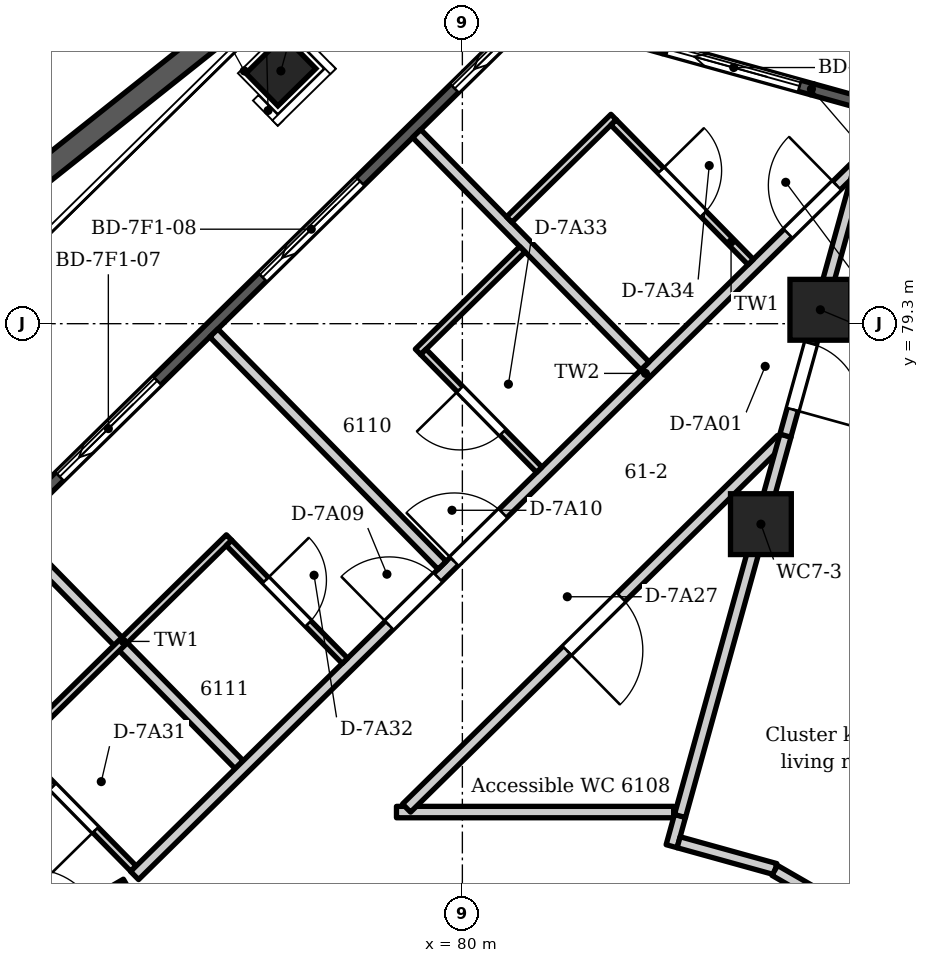
"""IFC4 building model, lengths in metres.
Left out: names, types, materials, properties, quantities, classifications, styles, units other than length and angle.
Written with IfcOpenShell. Run it as: python <this file> out.ifc"""

import sys

from ifc_helpers import new_model, si_unit, direction, frame, frame_2d, origin, origin_2d, place, context, subcontext, project, spatial, polyline, rectangle, circle, outline, extrude, element, fill, save


model = new_model("IFC4")
c1 = context("Model", 3, precision=1e-05, world=origin(), true_north=direction((0.0, 1.0)))
c2 = subcontext(c1, "Body", "Model", "MODEL_VIEW")
j1 = project(units=[si_unit("LENGTHUNIT", "METRE"), si_unit("PLANEANGLEUNIT", "RADIAN")], contexts=[c1])
p1 = place(None, origin())
s1 = spatial("IfcSite", under=j1, at=p1, CompositionType="ELEMENT")
p2 = place(p1, origin())
s2 = spatial("IfcBuilding", under=s1, at=p2, CompositionType="ELEMENT")
p3 = place(p2, frame((0.0, 0.0, 234.9)))
s3 = spatial("IfcBuildingStorey", under=s2, at=p3, CompositionType="ELEMENT", Elevation=234.9)
p4 = place(p3, frame((77.613, 82.625, -0.35), z_axis=(0.0, 0.0, 1.0), x_axis=(0.713250449154, 0.7009092643, 0.0)))
e1 = element("IfcColumn", 1, at=p4, inside=s3, PredefinedType="COLUMN", context=c2, shape_type="SweptSolid", body=[
    extrude(rectangle(XDim=0.7, YDim=0.6, at=origin_2d()), origin(), (0.0, 0.0, 1.0), 3.95),
])
for number, where, z_axis, x_axis in (
    (2, (83.928, 76.663, -0.35), (0.0, 0.0, 1.0), (1.0, 0.0, 0.0)),
    (3, (84.71, 79.483, -0.35), (0.0, 0.0, 1.0), (1.0, 0.0, 0.0)),
):
    element("IfcColumn", number, at=place(p3, frame(where, z_axis=z_axis, x_axis=x_axis)), inside=s3, PredefinedType="COLUMN", context=c2, shape_type="SweptSolid", body=[
        extrude(circle(Radius=0.4, at=origin_2d()), origin(), (0.0, 0.0, 1.0), 3.95),
    ])
p5 = place(p3, frame((57.99, 60.867, 0.0), z_axis=(0.0, 0.0, 1.0), x_axis=(0.713254682671, 0.700904956216, 0.0)))
e4 = element("IfcWall", 4, at=p5, inside=s3, PredefinedType="SOLIDWALL", context=c2, shape_type="SweptSolid", body=[
    extrude(outline(polyline([(0.149, 0.075), (0.149, -0.075), (33.537, -0.075), (33.537, 0.075), (0.149, 0.075)])), origin(), (0.0, 0.0, 1.0), 3.3),
])
p6 = place(p5, frame((1.171, 0.0, 0.0)))
e5 = element("IfcOpeningElement", 5, at=p6, cuts=e4, PredefinedType="OPENING", context=c2, shape_type="SweptSolid", body=[
    extrude(rectangle(XDim=1.8, YDim=2.6, at=frame_2d((0.9, 1.3))), frame((0.0, 0.085, 0.0), z_axis=(0.0, -1.0, 0.0), x_axis=(1.0, 0.0, 0.0)), (0.0, 0.0, 1.0), 0.17),
])
p7 = place(p5, frame((4.714, 0.0, 0.0)))
e6 = element("IfcOpeningElement", 6, at=p7, cuts=e4, PredefinedType="OPENING", context=c2, shape_type="SweptSolid", body=[
    extrude(rectangle(XDim=1.8, YDim=2.6, at=frame_2d((0.9, 1.3))), frame((0.0, 0.085, 0.0), z_axis=(0.0, -1.0, 0.0), x_axis=(1.0, 0.0, 0.0)), (0.0, 0.0, 1.0), 0.17),
])
p8 = place(p5, frame((8.457, 0.0, 0.0)))
e7 = element("IfcOpeningElement", 7, at=p8, cuts=e4, PredefinedType="OPENING", context=c2, shape_type="SweptSolid", body=[
    extrude(rectangle(XDim=1.8, YDim=2.6, at=frame_2d((0.9, 1.3))), frame((0.0, 0.085, 0.0), z_axis=(0.0, -1.0, 0.0), x_axis=(1.0, 0.0, 0.0)), (0.0, 0.0, 1.0), 0.17),
])
p9 = place(p5, frame((12.2, 0.0, 0.0)))
e8 = element("IfcOpeningElement", 8, at=p9, cuts=e4, PredefinedType="OPENING", context=c2, shape_type="SweptSolid", body=[
    extrude(rectangle(XDim=1.8, YDim=2.6, at=frame_2d((0.9, 1.3))), frame((0.0, 0.085, 0.0), z_axis=(0.0, -1.0, 0.0), x_axis=(1.0, 0.0, 0.0)), (0.0, 0.0, 1.0), 0.17),
])
p10 = place(p5, frame((15.943, 0.0, 0.0)))
e9 = element("IfcOpeningElement", 9, at=p10, cuts=e4, PredefinedType="OPENING", context=c2, shape_type="SweptSolid", body=[
    extrude(rectangle(XDim=1.8, YDim=2.6, at=frame_2d((0.9, 1.3))), frame((0.0, 0.085, 0.0), z_axis=(0.0, -1.0, 0.0), x_axis=(1.0, 0.0, 0.0)), (0.0, 0.0, 1.0), 0.17),
])
p11 = place(p5, frame((19.686, 0.0, 0.0)))
e10 = element("IfcOpeningElement", 10, at=p11, cuts=e4, PredefinedType="OPENING", context=c2, shape_type="SweptSolid", body=[
    extrude(rectangle(XDim=1.8, YDim=2.6, at=frame_2d((0.9, 1.3))), frame((0.0, 0.085, 0.0), z_axis=(0.0, -1.0, 0.0), x_axis=(1.0, 0.0, 0.0)), (0.0, 0.0, 1.0), 0.17),
])
p12 = place(p5, frame((23.429, 0.0, 0.0)))
e11 = element("IfcOpeningElement", 11, at=p12, cuts=e4, PredefinedType="OPENING", context=c2, shape_type="SweptSolid", body=[
    extrude(rectangle(XDim=1.8, YDim=2.6, at=frame_2d((0.9, 1.3))), frame((0.0, 0.085, 0.0), z_axis=(0.0, -1.0, 0.0), x_axis=(1.0, 0.0, 0.0)), (0.0, 0.0, 1.0), 0.17),
])
p13 = place(p5, frame((27.172, 0.0, 0.0)))
e12 = element("IfcOpeningElement", 12, at=p13, cuts=e4, PredefinedType="OPENING", context=c2, shape_type="SweptSolid", body=[
    extrude(rectangle(XDim=1.8, YDim=2.6, at=frame_2d((0.9, 1.3))), frame((0.0, 0.085, 0.0), z_axis=(0.0, -1.0, 0.0), x_axis=(1.0, 0.0, 0.0)), (0.0, 0.0, 1.0), 0.17),
])
p14 = place(p5, frame((30.715, 0.0, 0.0)))
e13 = element("IfcOpeningElement", 13, at=p14, cuts=e4, PredefinedType="OPENING", context=c2, shape_type="SweptSolid", body=[
    extrude(rectangle(XDim=1.8, YDim=2.6, at=frame_2d((0.9, 1.3))), frame((0.0, 0.085, 0.0), z_axis=(0.0, -1.0, 0.0), x_axis=(1.0, 0.0, 0.0)), (0.0, 0.0, 1.0), 0.17),
])
p15 = place(p3, frame((81.691, 83.191, 0.0), z_axis=(0.0, 0.0, 1.0), x_axis=(0.963668166343, -0.267102349627, 0.0)))
e14 = element("IfcWall", 14, at=p15, inside=s3, PredefinedType="SOLIDWALL", context=c2, shape_type="SweptSolid", body=[
    extrude(outline(polyline([(0.11, -0.075), (1.0, -0.075), (1.0, 0.075), (0.11, 0.075), (0.11, -0.075)])), origin(), (0.0, 0.0, 1.0), 3.3),
])
p16 = place(p3, frame((82.655, 82.924, 0.0), z_axis=(0.0, 0.0, 1.0), x_axis=(0.963623378646, -0.267263884816, 0.0)))
e15 = element("IfcWall", 15, at=p16, inside=s3, PredefinedType="SOLIDWALL", context=c2, shape_type="SweptSolid", body=[
    extrude(outline(polyline([(0.0, -0.075), (2.021, -0.075), (2.021, 0.075), (0.0, 0.075), (0.0, -0.075)])), origin(), (0.0, 0.0, 1.0), 2.75),
])
p17 = place(p16, frame((0.05, 0.0, 0.0)))
e16 = element("IfcOpeningElement", 16, at=p17, cuts=e15, PredefinedType="OPENING", context=c2, shape_type="SweptSolid", body=[
    extrude(rectangle(XDim=1.8, YDim=2.6, at=frame_2d((0.9, 1.3))), frame((0.0, 0.085, 0.0), z_axis=(0.0, -1.0, 0.0), x_axis=(1.0, 0.0, 0.0)), (0.0, 0.0, 1.0), 0.17),
])
p18 = place(p3, frame((84.603, 82.384, 0.0), z_axis=(0.0, 0.0, 1.0), x_axis=(0.963649164221, -0.267170897174, 0.0)))
e17 = element("IfcWall", 17, at=p18, inside=s3, PredefinedType="SOLIDWALL", context=c2, shape_type="SweptSolid", body=[
    extrude(outline(polyline([(0.0, -0.075), (1.757, -0.075), (1.757, 0.075), (0.0, 0.075), (0.0, -0.075)])), origin(), (0.0, 0.0, 1.0), 3.3),
])
p19 = place(p3, origin())
e18 = element("IfcWall", 18, at=p19, inside=s3, PredefinedType="PARAPET", context=c2, shape_type="SweptSolid", body=[
    extrude(outline(polyline([(80.313, 86.12), (49.243, 61.406), (49.565, 61.279), (78.266, 84.108), (80.313, 86.12)])), origin(), (0.0, 0.0, 1.0), 1.1),
])
p20 = place(p3, frame((74.06, 76.554, 0.0), z_axis=(0.0, 0.0, 1.0), x_axis=(0.70095501421, -0.713205487958, 0.0)))
e19 = element("IfcWall", 19, at=p20, inside=s3, PredefinedType="PARTITIONING", context=c2, shape_type="SweptSolid", body=[
    extrude(rectangle(XDim=4.285, YDim=0.15, at=frame_2d((2.142, 0.0))), origin(), (0.0, 0.0, 1.0), 3.3),
])
p21 = place(p3, frame((74.078, 73.754, 0.0), z_axis=(0.0, 0.0, 1.0), x_axis=(0.701016248593, -0.713145300207, 0.0)))
e20 = element("IfcWall", 20, at=p21, inside=s3, PredefinedType="PARTITIONING", context=c2, shape_type="SweptSolid", body=[
    extrude(rectangle(XDim=2.274, YDim=0.1, at=frame_2d((1.137, 0.0))), origin(), (0.0, 0.0, 1.0), 3.3),
])
p22 = place(p21, frame((0.762, 0.0, 0.0)))
e21 = element("IfcOpeningElement", 21, at=p22, cuts=e20, PredefinedType="OPENING", context=c2, shape_type="SweptSolid", body=[
    extrude(rectangle(XDim=0.8, YDim=2.1, at=frame_2d((0.4, 1.05))), frame((0.0, 0.06, 0.0), z_axis=(0.0, -1.0, 0.0), x_axis=(1.0, 0.0, 0.0)), (0.0, 0.0, 1.0), 0.12),
])
p23 = place(p3, frame((74.149, 73.753, 0.0), z_axis=(0.0, 0.0, 1.0), x_axis=(0.713214004819, 0.700946348396, 0.0)))
e22 = element("IfcWall", 22, at=p23, inside=s3, PredefinedType="PARTITIONING", context=c2, shape_type="SweptSolid", body=[
    extrude(rectangle(XDim=3.901, YDim=0.1, at=frame_2d((1.95, 0.0))), origin(), (0.0, 0.0, 1.0), 3.3),
])
p24 = place(p3, frame((74.224, 71.146, 0.0), z_axis=(0.0, 0.0, 1.0), x_axis=(0.866052944554, 0.499952294954, 0.0)))
e23 = element("IfcWall", 23, at=p24, inside=s3, PredefinedType="PARTITIONING", context=c2, shape_type="SweptSolid", body=[
    extrude(rectangle(XDim=1.563, YDim=0.15, at=frame_2d((0.782, 0.0))), origin(), (0.0, 0.0, 1.0), 3.3),
])
p25 = place(p24, frame((0.15, 0.0, 0.0)))
e24 = element("IfcOpeningElement", 24, at=p25, cuts=e23, PredefinedType="OPENING", context=c2, shape_type="SweptSolid", body=[
    extrude(rectangle(XDim=0.9, YDim=2.1, at=frame_2d((0.45, 1.05))), frame((0.0, 0.085, 0.0), z_axis=(0.0, -1.0, 0.0), x_axis=(1.0, 0.0, 0.0)), (0.0, 0.0, 1.0), 0.17),
])
p26 = place(p3, frame((75.687, 72.04, 0.0), z_axis=(0.0, 0.0, 1.0), x_axis=(0.713216712947, 0.700943592861, 0.0)))
e25 = element("IfcWall", 25, at=p26, inside=s3, PredefinedType="PARTITIONING", context=c2, shape_type="SweptSolid", body=[
    extrude(rectangle(XDim=13.487, YDim=0.15, at=frame_2d((6.744, 0.0))), origin(), (0.0, 0.0, 1.0), 2.75),
])
p27 = place(p26, frame((4.697, 0.0, 0.0)))
e26 = element("IfcOpeningElement", 26, at=p27, cuts=e25, PredefinedType="OPENING", context=c2, shape_type="SweptSolid", body=[
    extrude(rectangle(XDim=0.9, YDim=2.1, at=frame_2d((0.45, 1.05))), frame((0.0, 0.085, 0.0), z_axis=(0.0, -1.0, 0.0), x_axis=(1.0, 0.0, 0.0)), (0.0, 0.0, 1.0), 0.17),
])
p28 = place(p26, frame((5.897, 0.0, 0.0)))
e27 = element("IfcOpeningElement", 27, at=p28, cuts=e25, PredefinedType="OPENING", context=c2, shape_type="SweptSolid", body=[
    extrude(rectangle(XDim=0.9, YDim=2.1, at=frame_2d((0.45, 1.05))), frame((0.0, 0.085, 0.0), z_axis=(0.0, -1.0, 0.0), x_axis=(1.0, 0.0, 0.0)), (0.0, 0.0, 1.0), 0.17),
])
p29 = place(p26, frame((12.053, 0.0, 0.0)))
e28 = element("IfcOpeningElement", 28, at=p29, cuts=e25, PredefinedType="OPENING", context=c2, shape_type="SweptSolid", body=[
    extrude(rectangle(XDim=0.9, YDim=2.1, at=frame_2d((0.45, 1.05))), frame((0.0, 0.085, 0.0), z_axis=(0.0, -1.0, 0.0), x_axis=(1.0, 0.0, 0.0)), (0.0, 0.0, 1.0), 0.17),
])
p30 = place(p3, frame((76.73, 79.177, 0.0), z_axis=(0.0, 0.0, 1.0), x_axis=(0.70095501421, -0.713205487958, 0.0)))
e29 = element("IfcWall", 29, at=p30, inside=s3, PredefinedType="PARTITIONING", context=c2, shape_type="SweptSolid", body=[
    extrude(rectangle(XDim=4.285, YDim=0.15, at=frame_2d((2.142, 0.0))), origin(), (0.0, 0.0, 1.0), 3.3),
])
p31 = place(p3, frame((76.93, 76.416, 0.0), z_axis=(0.0, 0.0, 1.0), x_axis=(0.700793702446, -0.713363993073, 0.0)))
e30 = element("IfcWall", 30, at=p31, inside=s3, PredefinedType="PARTITIONING", context=c2, shape_type="SweptSolid", body=[
    extrude(rectangle(XDim=2.175, YDim=0.1, at=frame_2d((1.088, 0.0))), origin(), (0.0, 0.0, 1.0), 3.3),
])
p32 = place(p31, frame((0.688, 0.0, 0.0)))
e31 = element("IfcOpeningElement", 31, at=p32, cuts=e30, PredefinedType="OPENING", context=c2, shape_type="SweptSolid", body=[
    extrude(rectangle(XDim=0.8, YDim=2.1, at=frame_2d((0.4, 1.05))), frame((0.0, 0.06, 0.0), z_axis=(0.0, -1.0, 0.0), x_axis=(1.0, 0.0, 0.0)), (0.0, 0.0, 1.0), 0.12),
])
p33 = place(p3, frame((79.133, 72.875, 0.0), z_axis=(0.0, 0.0, 1.0), x_axis=(1.0, 0.0, 0.0)))
e32 = element("IfcWall", 32, at=p33, inside=s3, PredefinedType="PARTITIONING", context=c2, shape_type="SweptSolid", body=[
    extrude(rectangle(XDim=3.647, YDim=0.15, at=frame_2d((1.823, 0.0))), origin(), (0.0, 0.0, 1.0), 2.8),
])
p34 = place(p3, frame((79.265, 72.927, 0.0), z_axis=(0.0, 0.0, 1.0), x_axis=(0.713171352484, 0.700989744572, 0.0)))
e33 = element("IfcWall", 33, at=p34, inside=s3, PredefinedType="PARTITIONING", context=c2, shape_type="SweptSolid", body=[
    extrude(rectangle(XDim=6.914, YDim=0.15, at=frame_2d((3.457, 0.0))), origin(), (0.0, 0.0, 1.0), 2.8),
])
p35 = place(p34, frame((2.957, 0.0, 0.0)))
e34 = element("IfcOpeningElement", 34, at=p35, cuts=e33, PredefinedType="OPENING", context=c2, shape_type="SweptSolid", body=[
    extrude(rectangle(XDim=1.0, YDim=2.1, at=frame_2d((0.5, 1.05))), frame((0.0, 0.085, 0.0), z_axis=(0.0, -1.0, 0.0), x_axis=(1.0, 0.0, 0.0)), (0.0, 0.0, 1.0), 0.17),
])
p36 = place(p3, frame((79.399, 81.802, 0.0), z_axis=(0.0, 0.0, 1.0), x_axis=(0.70095501421, -0.713205487958, 0.0)))
e35 = element("IfcWall", 35, at=p36, inside=s3, PredefinedType="PARTITIONING", context=c2, shape_type="SweptSolid", body=[
    extrude(rectangle(XDim=4.285, YDim=0.15, at=frame_2d((2.142, 0.0))), origin(), (0.0, 0.0, 1.0), 3.3),
])
p37 = place(p3, frame((79.416, 78.93, 0.0), z_axis=(0.0, 0.0, 1.0), x_axis=(0.713293055377, 0.700865905257, 0.0)))
e36 = element("IfcWall", 36, at=p37, inside=s3, PredefinedType="PARTITIONING", context=c2, shape_type="SweptSolid", body=[
    extrude(rectangle(XDim=1.925, YDim=0.1, at=frame_2d((0.963, 0.0))), origin(), (0.0, 0.0, 1.0), 3.3),
])
p38 = place(p3, frame((79.487, 78.929, 0.0), z_axis=(0.0, 0.0, 1.0), x_axis=(0.701018173636, -0.713143407901, 0.0)))
e37 = element("IfcWall", 37, at=p38, inside=s3, PredefinedType="PARTITIONING", context=c2, shape_type="SweptSolid", body=[
    extrude(rectangle(XDim=2.175, YDim=0.1, at=frame_2d((1.087, 0.0))), origin(), (0.0, 0.0, 1.0), 3.3),
])
p39 = place(p38, frame((0.687, 0.0, 0.0)))
e38 = element("IfcOpeningElement", 38, at=p39, cuts=e37, PredefinedType="OPENING", context=c2, shape_type="SweptSolid", body=[
    extrude(rectangle(XDim=0.8, YDim=2.1, at=frame_2d((0.4, 1.05))), frame((0.0, 0.06, 0.0), z_axis=(0.0, -1.0, 0.0), x_axis=(1.0, 0.0, 0.0)), (0.0, 0.0, 1.0), 0.12),
])
p40 = place(p3, frame((80.616, 80.67, 0.0), z_axis=(0.0, 0.0, 1.0), x_axis=(0.713293055377, 0.700865905257, 0.0)))
e39 = element("IfcWall", 39, at=p40, inside=s3, PredefinedType="PARTITIONING", context=c2, shape_type="SweptSolid", body=[
    extrude(rectangle(XDim=1.925, YDim=0.1, at=frame_2d((0.963, 0.0))), origin(), (0.0, 0.0, 1.0), 3.3),
])
p41 = place(p3, frame((81.989, 81.948, 0.0), z_axis=(0.0, 0.0, 1.0), x_axis=(0.700820910795, -0.713337263146, 0.0)))
e40 = element("IfcWall", 40, at=p41, inside=s3, PredefinedType="PARTITIONING", context=c2, shape_type="SweptSolid", body=[
    extrude(rectangle(XDim=2.575, YDim=0.1, at=frame_2d((1.287, 0.0))), origin(), (0.0, 0.0, 1.0), 3.3),
])
p42 = place(p41, frame((0.887, 0.0, 0.0)))
e41 = element("IfcOpeningElement", 41, at=p42, cuts=e40, PredefinedType="OPENING", context=c2, shape_type="SweptSolid", body=[
    extrude(rectangle(XDim=0.8, YDim=2.1, at=frame_2d((0.4, 1.05))), frame((0.0, 0.06, 0.0), z_axis=(0.0, -1.0, 0.0), x_axis=(1.0, 0.0, 0.0)), (0.0, 0.0, 1.0), 0.12),
])
p43 = place(p3, frame((82.753, 72.426, 0.0), z_axis=(0.0, 0.0, 1.0), x_axis=(0.266887464326, 0.96372770085, 0.0)))
e42 = element("IfcWall", 42, at=p43, inside=s3, PredefinedType="PARTITIONING", context=c2, shape_type="SweptSolid", body=[
    extrude(rectangle(XDim=0.416, YDim=0.15, at=frame_2d((0.208, 0.0))), origin(), (0.0, 0.0, 1.0), 2.8),
])
p44 = place(p3, frame((82.845, 72.478, 0.0), z_axis=(0.0, 0.0, 1.0), x_axis=(0.963623826389, -0.267262270467, 0.0)))
e43 = element("IfcWall", 43, at=p44, inside=s3, PredefinedType="PARTITIONING", context=c2, shape_type="SweptSolid", body=[
    extrude(rectangle(XDim=1.32, YDim=0.15, at=frame_2d((0.66, 0.0))), origin(), (0.0, 0.0, 1.0), 2.8),
])
p45 = place(p3, frame((82.863, 72.823, 0.0), z_axis=(0.0, 0.0, 1.0), x_axis=(0.267297315726, 0.963614105857, 0.0)))
e44 = element("IfcWall", 44, at=p45, inside=s3, PredefinedType="PARTITIONING", context=c2, shape_type="SweptSolid", body=[
    extrude(rectangle(XDim=5.196, YDim=0.15, at=frame_2d((2.598, 0.0))), origin(), (0.0, 0.0, 1.0), 2.8),
])
p46 = place(p3, frame((84.11, 72.107, 0.0), z_axis=(0.0, 0.0, 1.0), x_axis=(0.865965412825, -0.500103892997, 0.0)))
e45 = element("IfcWall", 45, at=p46, inside=s3, PredefinedType="PARTITIONING", context=c2, shape_type="SweptSolid", body=[
    extrude(rectangle(XDim=2.271, YDim=0.15, at=frame_2d((1.136, 0.0))), origin(), (0.0, 0.0, 1.0), 3.3),
])
p47 = place(p3, frame((84.25, 77.827, 0.0), z_axis=(0.0, 0.0, 1.0), x_axis=(0.267414329718, 0.963581639645, 0.0)))
e46 = element("IfcWall", 46, at=p47, inside=s3, PredefinedType="PARTITIONING", context=c2, shape_type="SweptSolid", body=[
    extrude(rectangle(XDim=3.676, YDim=0.15, at=frame_2d((1.838, 0.0))), origin(), (0.0, 0.0, 1.0), 2.75),
])
p48 = place(p47, frame((0.357, 0.0, 0.0)))
e47 = element("IfcOpeningElement", 47, at=p48, cuts=e46, PredefinedType="OPENING", context=c2, shape_type="SweptSolid", body=[
    extrude(rectangle(XDim=0.9, YDim=2.1, at=frame_2d((0.45, 1.05))), frame((0.0, 0.085, 0.0), z_axis=(0.0, -1.0, 0.0), x_axis=(1.0, 0.0, 0.0)), (0.0, 0.0, 1.0), 0.17),
])
p49 = place(p12, origin())
e48 = element("IfcDoor", 48, at=p49, inside=s3, OperationType="SLIDING_TO_LEFT", PredefinedType="DOOR", context=c2, shape_type="SweptSolid", body=[
    extrude(rectangle(XDim=1.8, YDim=2.6, at=frame_2d((0.9, 1.3))), frame((0.0, 0.025, 0.0), z_axis=(0.0, -1.0, 0.0), x_axis=(1.0, 0.0, 0.0)), (0.0, 0.0, 1.0), 0.05),
])
fill(e11, e48)
p50 = place(p13, origin())
e49 = element("IfcDoor", 49, at=p50, inside=s3, OperationType="SLIDING_TO_LEFT", PredefinedType="DOOR", context=c2, shape_type="SweptSolid", body=[
    extrude(rectangle(XDim=1.8, YDim=2.6, at=frame_2d((0.9, 1.3))), frame((0.0, 0.025, 0.0), z_axis=(0.0, -1.0, 0.0), x_axis=(1.0, 0.0, 0.0)), (0.0, 0.0, 1.0), 0.05),
])
fill(e12, e49)
p51 = place(p14, origin())
e50 = element("IfcDoor", 50, at=p51, inside=s3, OperationType="SLIDING_TO_LEFT", PredefinedType="DOOR", context=c2, shape_type="SweptSolid", body=[
    extrude(rectangle(XDim=1.8, YDim=2.6, at=frame_2d((0.9, 1.3))), frame((0.0, 0.025, 0.0), z_axis=(0.0, -1.0, 0.0), x_axis=(1.0, 0.0, 0.0)), (0.0, 0.0, 1.0), 0.05),
])
fill(e13, e50)
p52 = place(p17, origin())
e51 = element("IfcDoor", 51, at=p52, inside=s3, OperationType="SLIDING_TO_LEFT", PredefinedType="DOOR", context=c2, shape_type="SweptSolid", body=[
    extrude(rectangle(XDim=1.8, YDim=2.6, at=frame_2d((0.9, 1.3))), frame((0.0, 0.025, 0.0), z_axis=(0.0, -1.0, 0.0), x_axis=(1.0, 0.0, 0.0)), (0.0, 0.0, 1.0), 0.05),
])
fill(e16, e51)
p53 = place(p48, frame((0.9, 0.0, 0.0), z_axis=(0.0, 0.0, 1.0), x_axis=(-1.0, 0.0, 0.0)))
e52 = element("IfcDoor", 52, at=p53, inside=s3, OperationType="SINGLE_SWING_RIGHT", PredefinedType="DOOR", context=c2, shape_type="SweptSolid", body=[
    extrude(rectangle(XDim=0.9, YDim=2.1, at=frame_2d((0.45, 1.05))), frame((0.0, 0.025, 0.0), z_axis=(0.0, -1.0, 0.0), x_axis=(1.0, 0.0, 0.0)), (0.0, 0.0, 1.0), 0.05),
])
fill(e47, e52)
p54 = place(p27, origin())
e53 = element("IfcDoor", 53, at=p54, inside=s3, OperationType="SINGLE_SWING_LEFT", PredefinedType="DOOR", context=c2, shape_type="SweptSolid", body=[
    extrude(rectangle(XDim=0.9, YDim=2.1, at=frame_2d((0.45, 1.05))), frame((0.0, 0.025, 0.0), z_axis=(0.0, -1.0, 0.0), x_axis=(1.0, 0.0, 0.0)), (0.0, 0.0, 1.0), 0.05),
])
fill(e26, e53)
p55 = place(p28, origin())
e54 = element("IfcDoor", 54, at=p55, inside=s3, OperationType="SINGLE_SWING_LEFT", PredefinedType="DOOR", context=c2, shape_type="SweptSolid", body=[
    extrude(rectangle(XDim=0.9, YDim=2.1, at=frame_2d((0.45, 1.05))), frame((0.0, 0.025, 0.0), z_axis=(0.0, -1.0, 0.0), x_axis=(1.0, 0.0, 0.0)), (0.0, 0.0, 1.0), 0.05),
])
fill(e27, e54)
p56 = place(p29, origin())
e55 = element("IfcDoor", 55, at=p56, inside=s3, OperationType="SINGLE_SWING_RIGHT", PredefinedType="DOOR", context=c2, shape_type="SweptSolid", body=[
    extrude(rectangle(XDim=0.9, YDim=2.1, at=frame_2d((0.45, 1.05))), frame((0.0, 0.025, 0.0), z_axis=(0.0, -1.0, 0.0), x_axis=(1.0, 0.0, 0.0)), (0.0, 0.0, 1.0), 0.05),
])
fill(e28, e55)
p57 = place(p35, frame((1.0, 0.0, 0.0), z_axis=(0.0, 0.0, 1.0), x_axis=(-1.0, 0.0, 0.0)))
e56 = element("IfcDoor", 56, at=p57, inside=s3, OperationType="SINGLE_SWING_RIGHT", PredefinedType="DOOR", context=c2, shape_type="SweptSolid", body=[
    extrude(rectangle(XDim=1.0, YDim=2.1, at=frame_2d((0.5, 1.05))), frame((0.0, 0.025, 0.0), z_axis=(0.0, -1.0, 0.0), x_axis=(1.0, 0.0, 0.0)), (0.0, 0.0, 1.0), 0.05),
])
fill(e34, e56)
p58 = place(p22, frame((0.8, 0.0, 0.0), z_axis=(0.0, 0.0, 1.0), x_axis=(-1.0, 0.0, 0.0)))
e57 = element("IfcDoor", 57, at=p58, inside=s3, OperationType="SINGLE_SWING_LEFT", PredefinedType="DOOR", context=c2, shape_type="SweptSolid", body=[
    extrude(rectangle(XDim=0.8, YDim=2.1, at=frame_2d((0.4, 1.05))), frame((0.0, 0.025, 0.0), z_axis=(0.0, -1.0, 0.0), x_axis=(1.0, 0.0, 0.0)), (0.0, 0.0, 1.0), 0.05),
])
fill(e21, e57)
p59 = place(p32, origin())
e58 = element("IfcDoor", 58, at=p59, inside=s3, OperationType="SINGLE_SWING_LEFT", PredefinedType="DOOR", context=c2, shape_type="SweptSolid", body=[
    extrude(rectangle(XDim=0.8, YDim=2.1, at=frame_2d((0.4, 1.05))), frame((0.0, 0.025, 0.0), z_axis=(0.0, -1.0, 0.0), x_axis=(1.0, 0.0, 0.0)), (0.0, 0.0, 1.0), 0.05),
])
fill(e31, e58)
p60 = place(p39, frame((0.8, 0.0, 0.0), z_axis=(0.0, 0.0, 1.0), x_axis=(-1.0, 0.0, 0.0)))
e59 = element("IfcDoor", 59, at=p60, inside=s3, OperationType="SINGLE_SWING_RIGHT", PredefinedType="DOOR", context=c2, shape_type="SweptSolid", body=[
    extrude(rectangle(XDim=0.8, YDim=2.1, at=frame_2d((0.4, 1.05))), frame((0.0, 0.025, 0.0), z_axis=(0.0, -1.0, 0.0), x_axis=(1.0, 0.0, 0.0)), (0.0, 0.0, 1.0), 0.05),
])
fill(e38, e59)
p61 = place(p42, origin())
e60 = element("IfcDoor", 60, at=p61, inside=s3, OperationType="SINGLE_SWING_LEFT", PredefinedType="DOOR", context=c2, shape_type="SweptSolid", body=[
    extrude(rectangle(XDim=0.8, YDim=2.1, at=frame_2d((0.4, 1.05))), frame((0.0, 0.025, 0.0), z_axis=(0.0, -1.0, 0.0), x_axis=(1.0, 0.0, 0.0)), (0.0, 0.0, 1.0), 0.05),
])
fill(e41, e60)
save(model, sys.argv[1])
